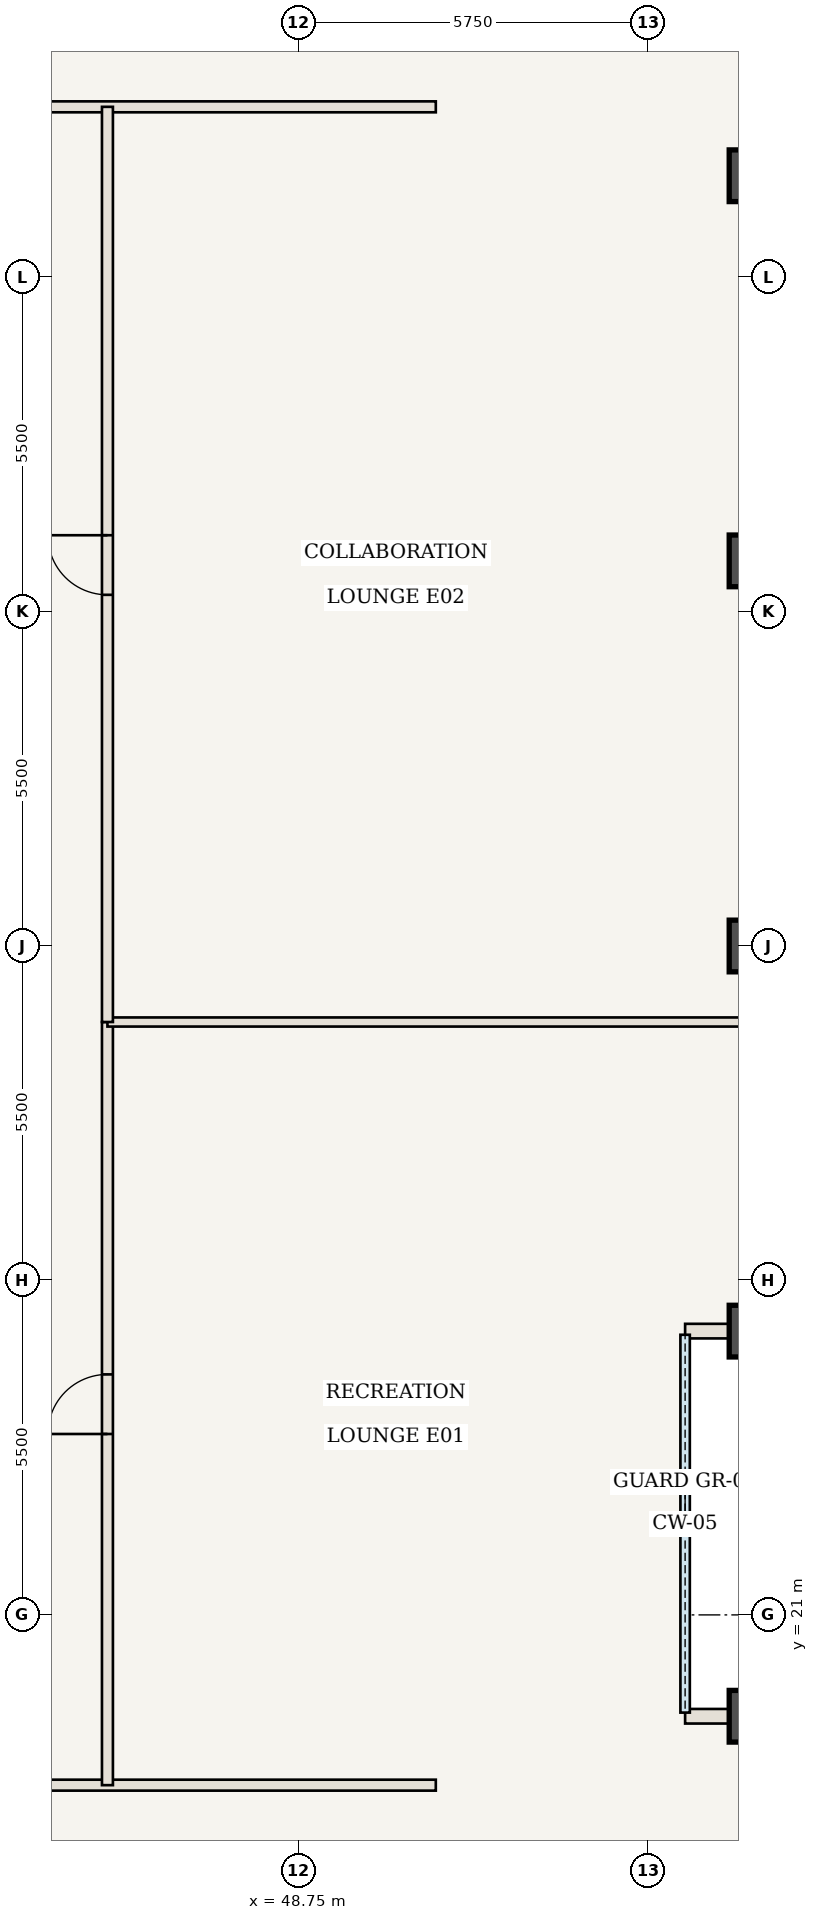
"""IFC4 building model, lengths in metres.
Left out: names, types, materials, properties, quantities, classifications, styles, units other than length and angle.
Written with IfcOpenShell. Run it as: python <this file> out.ifc"""

import sys

from ifc_helpers import new_model, si_unit, direction, frame, frame_2d, origin, origin_2d, place, context, subcontext, project, spatial, rectangle, extrude, element, fill, save


model = new_model("IFC4")
c1 = context("Model", 3, precision=1e-05, world=origin(), true_north=direction((0.0, 1.0)))
c2 = subcontext(c1, "Body", "Model", "MODEL_VIEW")
j1 = project(units=[si_unit("LENGTHUNIT", "METRE"), si_unit("PLANEANGLEUNIT", "RADIAN")], contexts=[c1])
p1 = place(None, origin())
s1 = spatial("IfcSite", under=j1, at=p1, CompositionType="ELEMENT")
p2 = place(p1, origin())
s2 = spatial("IfcBuilding", under=s1, at=p2, CompositionType="ELEMENT")
p3 = place(p2, frame((0.0, 0.0, 244.65)))
s3 = spatial("IfcBuildingStorey", under=s2, at=p3, CompositionType="ELEMENT", Elevation=244.65)
for number, where, z_axis, x_axis in (
    (1, (56.25, 19.333, 0.0), (0.0, 0.0, 1.0), (1.0, 0.0, 0.0)),
    (2, (56.25, 25.667, 0.0), (0.0, 0.0, 1.0), (1.0, 0.0, 0.0)),
    (3, (56.25, 32.0, 0.0), (0.0, 0.0, 1.0), (1.0, 0.0, 0.0)),
    (4, (56.25, 38.333, 0.0), (0.0, 0.0, 1.0), (1.0, 0.0, 0.0)),
    (5, (56.25, 44.667, 0.0), (0.0, 0.0, 1.0), (1.0, 0.0, 0.0)),
):
    element("IfcColumn", number, at=place(p3, frame(where, z_axis=z_axis, x_axis=x_axis)), inside=s3, PredefinedType="COLUMN", context=c2, shape_type="SweptSolid", body=[
        extrude(rectangle(XDim=0.85, YDim=0.85, at=origin_2d()), origin(), (0.0, 0.0, 1.0), 3.85),
    ])
p4 = place(p3, frame((13.0, 18.2, 0.0), z_axis=(0.0, 0.0, 1.0), x_axis=(1.0, 0.0, 0.0)))
e6 = element("IfcWall", 6, at=p4, inside=s3, PredefinedType="STANDARD", context=c2, shape_type="SweptSolid", body=[
    extrude(rectangle(XDim=38.0, YDim=0.18, at=frame_2d((19.0, 0.0))), origin(), (0.0, 0.0, 1.0), 3.685),
])
p5 = place(p4, frame((19.825, 0.0, 0.0)))
e7 = element("IfcOpeningElement", 7, at=p5, cuts=e6, PredefinedType="OPENING", context=c2, shape_type="SweptSolid", body=[
    extrude(rectangle(XDim=0.98, YDim=2.2, at=frame_2d((0.49, 1.1))), frame((0.0, 0.1, 0.0), z_axis=(0.0, -1.0, 0.0), x_axis=(1.0, 0.0, 0.0)), (0.0, 0.0, 1.0), 0.2),
])
p6 = place(p3, frame((39.558, 45.8, 0.0), z_axis=(0.0, 0.0, 1.0), x_axis=(1.0, 0.0, 0.0)))
e8 = element("IfcWall", 8, at=p6, inside=s3, PredefinedType="STANDARD", context=c2, shape_type="SweptSolid", body=[
    extrude(rectangle(XDim=11.442, YDim=0.18, at=frame_2d((5.721, 0.0))), origin(), (0.0, 0.0, 1.0), 3.685),
])
p7 = place(p6, frame((1.046, 0.0, 0.0)))
e9 = element("IfcOpeningElement", 9, at=p7, cuts=e8, PredefinedType="OPENING", context=c2, shape_type="SweptSolid", body=[
    extrude(rectangle(XDim=0.98, YDim=2.2, at=frame_2d((0.49, 1.1))), frame((0.0, 0.1, 0.0), z_axis=(0.0, -1.0, 0.0), x_axis=(1.0, 0.0, 0.0)), (0.0, 0.0, 1.0), 0.2),
])
p8 = place(p3, frame((45.6, 18.2, 0.0), z_axis=(0.0, 0.0, 1.0), x_axis=(0.0, 1.0, 0.0)))
e10 = element("IfcWall", 10, at=p8, inside=s3, PredefinedType="STANDARD", context=c2, shape_type="SweptSolid", body=[
    extrude(rectangle(XDim=12.55, YDim=0.18, at=frame_2d((6.275, 0.0))), origin(), (0.0, 0.0, 1.0), 3.685),
])
p9 = place(p8, frame((5.775, 0.0, 0.0)))
e11 = element("IfcOpeningElement", 11, at=p9, cuts=e10, PredefinedType="OPENING", context=c2, shape_type="SweptSolid", body=[
    extrude(rectangle(XDim=0.98, YDim=2.2, at=frame_2d((0.49, 1.1))), frame((0.0, 0.1, 0.0), z_axis=(0.0, -1.0, 0.0), x_axis=(1.0, 0.0, 0.0)), (0.0, 0.0, 1.0), 0.2),
])
p10 = place(p3, frame((45.6, 30.75, 0.0), z_axis=(0.0, 0.0, 1.0), x_axis=(1.0, 0.0, 0.0)))
e12 = element("IfcWall", 12, at=p10, inside=s3, PredefinedType="STANDARD", context=c2, shape_type="SweptSolid", body=[
    extrude(rectangle(XDim=10.59, YDim=0.15, at=frame_2d((5.295, 0.0))), origin(), (0.0, 0.0, 1.0), 3.685),
])
p11 = place(p3, frame((45.6, 30.75, 0.0), z_axis=(0.0, 0.0, 1.0), x_axis=(0.0, 1.0, 0.0)))
e13 = element("IfcWall", 13, at=p11, inside=s3, PredefinedType="STANDARD", context=c2, shape_type="SweptSolid", body=[
    extrude(rectangle(XDim=15.05, YDim=0.18, at=frame_2d((7.525, 0.0))), origin(), (0.0, 0.0, 1.0), 3.685),
])
p12 = place(p11, frame((7.025, 0.0, 0.0)))
e14 = element("IfcOpeningElement", 14, at=p12, cuts=e13, PredefinedType="OPENING", context=c2, shape_type="SweptSolid", body=[
    extrude(rectangle(XDim=0.98, YDim=2.2, at=frame_2d((0.49, 1.1))), frame((0.0, 0.1, 0.0), z_axis=(0.0, -1.0, 0.0), x_axis=(1.0, 0.0, 0.0)), (0.0, 0.0, 1.0), 0.2),
])
for number, where, z_axis, x_axis in (
    (15, (56.25, 19.333, 0.0), (0.0, 0.0, 1.0), (-1.0, 0.0, 0.0)),
    (16, (56.25, 25.667, 0.0), (0.0, 0.0, 1.0), (-1.0, 0.0, 0.0)),
):
    element("IfcWall", number, at=place(p3, frame(where, z_axis=z_axis, x_axis=x_axis)), inside=s3, PredefinedType="USERDEFINED", context=c2, shape_type="SweptSolid", body=[
        extrude(rectangle(XDim=1.15, YDim=0.24, at=frame_2d((0.575, 0.0))), origin(), (0.0, 0.0, 1.0), 2.985),
    ])
p13 = place(p9, origin())
e17 = element("IfcDoor", 17, at=p13, inside=s3, OperationType="SINGLE_SWING_LEFT", PredefinedType="DOOR", context=c2, shape_type="SweptSolid", body=[
    extrude(rectangle(XDim=0.98, YDim=2.2, at=frame_2d((0.49, 1.1))), frame((0.0, 0.025, 0.0), z_axis=(0.0, -1.0, 0.0), x_axis=(1.0, 0.0, 0.0)), (0.0, 0.0, 1.0), 0.05),
])
fill(e11, e17)
p14 = place(p12, origin())
e18 = element("IfcDoor", 18, at=p14, inside=s3, OperationType="SINGLE_SWING_RIGHT", PredefinedType="DOOR", context=c2, shape_type="SweptSolid", body=[
    extrude(rectangle(XDim=0.98, YDim=2.2, at=frame_2d((0.49, 1.1))), frame((0.0, 0.025, 0.0), z_axis=(0.0, -1.0, 0.0), x_axis=(1.0, 0.0, 0.0)), (0.0, 0.0, 1.0), 0.05),
])
fill(e14, e18)
save(model, sys.argv[1])
